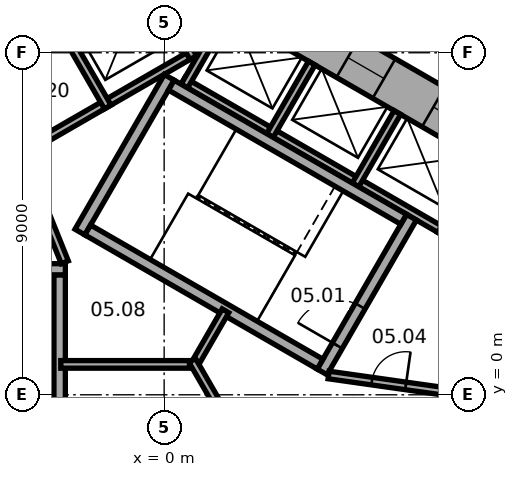
"""IFC4 building model, lengths in metres.
Left out: names, types, materials, properties, quantities, classifications, styles, units other than length and angle.
Written with IfcOpenShell. Run it as: python <this file> out.ifc"""

import sys

from ifc_helpers import new_model, si_unit, direction, frame, frame_2d, origin, place, context, subcontext, project, spatial, rectangle, extrude, element, fill, save


model = new_model("IFC4")
c1 = context("Model", 3, precision=1e-05, world=origin(), true_north=direction((0.0, 1.0)))
c2 = subcontext(c1, "Body", "Model", "MODEL_VIEW")
j1 = project(units=[si_unit("LENGTHUNIT", "METRE"), si_unit("PLANEANGLEUNIT", "RADIAN")], contexts=[c1])
p1 = place(None, origin())
s1 = spatial("IfcSite", under=j1, at=p1, CompositionType="ELEMENT")
p2 = place(p1, origin())
s2 = spatial("IfcBuilding", under=s1, at=p2, CompositionType="ELEMENT")
p3 = place(p2, frame((0.0, 0.0, 34.5)))
s3 = spatial("IfcBuildingStorey", under=s2, at=p3, CompositionType="ELEMENT", Elevation=34.5)
p4 = place(p3, frame((10.4, 5.658, 0.0), z_axis=(0.0, 0.0, 1.0), x_axis=(-0.866021384402, 0.500006961711, 0.0)))
e1 = element("IfcWall", 1, at=p4, inside=s3, PredefinedType="SHEAR", context=c2, shape_type="SweptSolid", body=[
    extrude(rectangle(XDim=12.355, YDim=1.2, at=frame_2d((6.178, 0.0))), origin(), (0.0, 0.0, 1.0), 4.5),
])
p5 = place(p4, frame((2.728, 0.0, 0.0)))
e2 = element("IfcOpeningElement", 2, at=p5, cuts=e1, PredefinedType="OPENING", context=c2, shape_type="SweptSolid", body=[
    extrude(rectangle(XDim=1.1, YDim=2.1, at=frame_2d((0.55, 1.05))), frame((0.0, 0.61, 0.0), z_axis=(0.0, -1.0, 0.0), x_axis=(1.0, 0.0, 0.0)), (0.0, 0.0, 1.0), 1.22),
])
p6 = place(p4, frame((5.328, 0.0, 0.0)))
e3 = element("IfcOpeningElement", 3, at=p6, cuts=e1, PredefinedType="OPENING", context=c2, shape_type="SweptSolid", body=[
    extrude(rectangle(XDim=1.1, YDim=2.1, at=frame_2d((0.55, 1.05))), frame((0.0, 0.61, 0.0), z_axis=(0.0, -1.0, 0.0), x_axis=(1.0, 0.0, 0.0)), (0.0, 0.0, 1.0), 1.22),
])
p7 = place(p4, frame((7.928, 0.0, 0.0)))
e4 = element("IfcOpeningElement", 4, at=p7, cuts=e1, PredefinedType="OPENING", context=c2, shape_type="SweptSolid", body=[
    extrude(rectangle(XDim=1.1, YDim=2.1, at=frame_2d((0.55, 1.05))), frame((0.0, 0.61, 0.0), z_axis=(0.0, -1.0, 0.0), x_axis=(1.0, 0.0, 0.0)), (0.0, 0.0, 1.0), 1.22),
])
p8 = place(p3, frame((0.3, 11.836, 0.0), z_axis=(0.0, 0.0, 1.0), x_axis=(-0.866021384402, -0.500006961711, 0.0)))
e5 = element("IfcWall", 5, at=p8, inside=s3, PredefinedType="SHEAR", context=c2, shape_type="SweptSolid", body=[
    extrude(rectangle(XDim=12.355, YDim=1.2, at=frame_2d((6.178, 0.0))), origin(), (0.0, 0.0, 1.0), 4.5),
])
p9 = place(p8, frame((6.378, 0.0, 0.0)))
e6 = element("IfcOpeningElement", 6, at=p9, cuts=e5, PredefinedType="OPENING", context=c2, shape_type="SweptSolid", body=[
    extrude(rectangle(XDim=1.5, YDim=2.1, at=frame_2d((0.75, 1.05))), frame((0.0, 0.61, 0.0), z_axis=(0.0, -1.0, 0.0), x_axis=(1.0, 0.0, 0.0)), (0.0, 0.0, 1.0), 1.22),
])
p10 = place(p8, frame((1.828, 0.0, 0.0)))
e7 = element("IfcOpeningElement", 7, at=p10, cuts=e5, PredefinedType="OPENING", context=c2, shape_type="SweptSolid", body=[
    extrude(rectangle(XDim=1.1, YDim=2.1, at=frame_2d((0.55, 1.05))), frame((0.0, 0.61, 0.0), z_axis=(0.0, -1.0, 0.0), x_axis=(1.0, 0.0, 0.0)), (0.0, 0.0, 1.0), 1.22),
])
p11 = place(p3, frame((7.424, 4.259, 0.0), z_axis=(0.0, 0.0, 1.0), x_axis=(-0.866026010844, 0.49999894854, 0.0)))
e8 = element("IfcWall", 8, at=p11, inside=s3, PredefinedType="PARTITIONING", context=c2, shape_type="SweptSolid", body=[
    extrude(rectangle(XDim=8.0, YDim=0.2, at=frame_2d((4.0, 0.0))), origin(), (0.0, 0.0, 1.0), 4.2),
])
for number, where, z_axis, x_axis in (
    (9, (7.287, 4.222, 0.0), (0.0, 0.0, 1.0), (0.5, 0.866, 0.0)),
    (10, (5.036, 5.522, 0.0), (0.0, 0.0, 1.0), (0.5, 0.866, 0.0)),
    (11, (2.784, 6.822, 0.0), (0.0, 0.0, 1.0), (0.5, 0.866, 0.0)),
    (12, (0.532, 8.122, 0.0), (0.0, 0.0, 1.0), (0.5, 0.866, 0.0)),
):
    element("IfcWall", number, at=place(p3, frame(where, z_axis=z_axis, x_axis=x_axis)), inside=s3, PredefinedType="PARTITIONING", context=c2, shape_type="SweptSolid", body=[
        extrude(rectangle(XDim=2.2, YDim=0.2, at=frame_2d((1.1, 0.0))), origin(), (0.0, 0.0, 1.0), 4.2),
    ])
p12 = place(p3, frame((0.803, 9.009, 0.0), z_axis=(0.0, 0.0, 1.0), x_axis=(-0.866028230842, -0.499995103361, 0.0)))
e13 = element("IfcWall", 13, at=p12, inside=s3, PredefinedType="PARTITIONING", context=c2, shape_type="SweptSolid", body=[
    extrude(rectangle(XDim=5.4, YDim=0.2, at=frame_2d((2.7, 0.0))), origin(), (0.0, 0.0, 1.0), 4.2),
])
p13 = place(p3, frame((0.767, 8.872, 0.0), z_axis=(0.0, 0.0, 1.0), x_axis=(-0.499994660107, 0.866028486751, 0.0)))
e14 = element("IfcWall", 14, at=p13, inside=s3, PredefinedType="PARTITIONING", context=c2, shape_type="SweptSolid", body=[
    extrude(rectangle(XDim=2.2, YDim=0.2, at=frame_2d((1.1, 0.0))), origin(), (0.0, 0.0, 1.0), 4.2),
])
p14 = place(p3, frame((-1.485, 7.572, 0.0), z_axis=(0.0, 0.0, 1.0), x_axis=(-0.50002983664, 0.866008176907, 0.0)))
e15 = element("IfcWall", 15, at=p14, inside=s3, PredefinedType="PARTITIONING", context=c2, shape_type="SweptSolid", body=[
    extrude(rectangle(XDim=2.2, YDim=0.2, at=frame_2d((1.1, 0.0))), origin(), (0.0, 0.0, 1.0), 4.2),
])
p15 = place(p3, frame((4.158, 0.602, 0.0), z_axis=(0.0, 0.0, 1.0), x_axis=(0.499977259774, 0.866038532462, 0.0)))
e16 = element("IfcWall", 16, at=p15, inside=s3, PredefinedType="SHEAR", context=c2, shape_type="SweptSolid", body=[
    extrude(rectangle(XDim=4.7, YDim=0.3, at=frame_2d((2.35, 0.0))), origin(), (0.0, 0.0, 1.0), 4.2),
])
p16 = place(p15, frame((0.8, 0.0, 0.0)))
e17 = element("IfcOpeningElement", 17, at=p16, cuts=e16, PredefinedType="OPENING", context=c2, shape_type="SweptSolid", body=[
    extrude(rectangle(XDim=1.2, YDim=2.1, at=frame_2d((0.6, 1.05))), frame((0.0, 0.16, 0.0), z_axis=(0.0, -1.0, 0.0), x_axis=(1.0, 0.0, 0.0)), (0.0, 0.0, 1.0), 0.32),
])
p17 = place(p3, frame((-2.216, 4.282, 0.0), z_axis=(0.0, 0.0, 1.0), x_axis=(0.499977259774, 0.866038532462, 0.0)))
e18 = element("IfcWall", 18, at=p17, inside=s3, PredefinedType="SHEAR", context=c2, shape_type="SweptSolid", body=[
    extrude(rectangle(XDim=4.7, YDim=0.3, at=frame_2d((2.35, 0.0))), origin(), (0.0, 0.0, 1.0), 4.2),
])
for number, where, z_axis, x_axis in (
    (19, (4.103, 0.807, 0.0), (0.0, 0.0, 1.0), (-0.866, 0.5, 0.0)),
    (20, (6.303, 4.617, 0.0), (0.0, 0.0, 1.0), (-0.866, 0.5, 0.0)),
):
    element("IfcWall", number, at=place(p3, frame(where, z_axis=z_axis, x_axis=x_axis)), inside=s3, PredefinedType="SHEAR", context=c2, shape_type="SweptSolid", body=[
        extrude(rectangle(XDim=7.06, YDim=0.3, at=frame_2d((3.53, 0.0))), origin(), (0.0, 0.0, 1.0), 4.2),
    ])
p18 = place(p3, frame((-2.6, 3.3, 0.0), z_axis=(0.0, 0.0, 1.0), x_axis=(-1.0, 0.0, 0.0)))
e21 = element("IfcWall", 21, at=p18, inside=s3, PredefinedType="SHEAR", context=c2, shape_type="SweptSolid", body=[
    extrude(rectangle(XDim=4.7, YDim=0.3, at=frame_2d((2.35, 0.0))), origin(), (0.0, 0.0, 1.0), 4.2),
])
p19 = place(p18, frame((0.8, 0.0, 0.0)))
e22 = element("IfcOpeningElement", 22, at=p19, cuts=e21, PredefinedType="OPENING", context=c2, shape_type="SweptSolid", body=[
    extrude(rectangle(XDim=1.2, YDim=2.1, at=frame_2d((0.6, 1.05))), frame((0.0, 0.16, 0.0), z_axis=(0.0, -1.0, 0.0), x_axis=(1.0, 0.0, 0.0)), (0.0, 0.0, 1.0), 0.32),
])
p20 = place(p3, frame((-2.75, 3.15, 0.0), z_axis=(0.0, 0.0, 1.0), x_axis=(0.0, -1.0, 0.0)))
e23 = element("IfcWall", 23, at=p20, inside=s3, PredefinedType="SHEAR", context=c2, shape_type="SweptSolid", body=[
    extrude(rectangle(XDim=7.06, YDim=0.3, at=frame_2d((3.53, 0.0))), origin(), (0.0, 0.0, 1.0), 4.2),
])
p21 = place(p3, frame((4.327, 0.521, 0.0), z_axis=(0.0, 0.0, 1.0), x_axis=(0.990124376366, -0.14019172346, 0.0)))
e24 = element("IfcWall", 24, at=p21, inside=s3, PredefinedType="PARTITIONING", context=c2, shape_type="SweptSolid", body=[
    extrude(rectangle(XDim=3.002, YDim=0.2, at=frame_2d((1.501, 0.0))), origin(), (0.0, 0.0, 1.0), 4.2),
])
p22 = place(p21, frame((1.15, 0.0, 0.0)))
e25 = element("IfcOpeningElement", 25, at=p22, cuts=e24, PredefinedType="OPENING", context=c2, shape_type="SweptSolid", body=[
    extrude(rectangle(XDim=0.9, YDim=2.1, at=frame_2d((0.45, 1.05))), frame((0.0, 0.11, 0.0), z_axis=(0.0, -1.0, 0.0), x_axis=(1.0, 0.0, 0.0)), (0.0, 0.0, 1.0), 0.22),
])
p23 = place(p3, frame((-2.615, 3.487, 0.0), z_axis=(0.0, 0.0, 1.0), x_axis=(-0.373576831041, 0.92759924068, 0.0)))
e26 = element("IfcWall", 26, at=p23, inside=s3, PredefinedType="PARTITIONING", context=c2, shape_type="SweptSolid", body=[
    extrude(rectangle(XDim=3.002, YDim=0.2, at=frame_2d((1.501, 0.0))), origin(), (0.0, 0.0, 1.0), 4.2),
])
p24 = place(p23, frame((1.15, 0.0, 0.0)))
e27 = element("IfcOpeningElement", 27, at=p24, cuts=e26, PredefinedType="OPENING", context=c2, shape_type="SweptSolid", body=[
    extrude(rectangle(XDim=0.9, YDim=2.1, at=frame_2d((0.45, 1.05))), frame((0.0, 0.11, 0.0), z_axis=(0.0, -1.0, 0.0), x_axis=(1.0, 0.0, 0.0)), (0.0, 0.0, 1.0), 0.22),
])
p25 = place(p3, frame((0.92, 0.8, 0.0), z_axis=(0.0, 0.0, 1.0), x_axis=(-1.0, 0.0, 0.0)))
e28 = element("IfcWall", 28, at=p25, inside=s3, PredefinedType="PARTITIONING", context=c2, shape_type="SweptSolid", body=[
    extrude(rectangle(XDim=3.64, YDim=0.2, at=frame_2d((1.82, 0.0))), origin(), (0.0, 0.0, 1.0), 4.2),
])
p26 = place(p3, frame((0.74, 0.696, 0.0), z_axis=(0.0, 0.0, 1.0), x_axis=(0.499956301907, 0.86605063142, 0.0)))
e29 = element("IfcWall", 29, at=p26, inside=s3, PredefinedType="PARTITIONING", context=c2, shape_type="SweptSolid", body=[
    extrude(rectangle(XDim=1.747, YDim=0.2, at=frame_2d((0.874, 0.0))), origin(), (0.0, 0.0, 1.0), 4.2),
])
p27 = place(p3, frame((0.74, 0.904, 0.0), z_axis=(0.0, 0.0, 1.0), x_axis=(0.500028278809, -0.866009076391, 0.0)))
e30 = element("IfcWall", 30, at=p27, inside=s3, PredefinedType="PARTITIONING", context=c2, shape_type="SweptSolid", body=[
    extrude(rectangle(XDim=3.133, YDim=0.2, at=frame_2d((1.566, 0.0))), origin(), (0.0, 0.0, 1.0), 4.2),
])
p28 = place(p16, origin())
e31 = element("IfcDoor", 31, at=p28, inside=s3, OperationType="SINGLE_SWING_RIGHT", PredefinedType="DOOR", context=c2, shape_type="SweptSolid", body=[
    extrude(rectangle(XDim=1.2, YDim=2.1, at=frame_2d((0.6, 1.05))), frame((0.0, 0.025, 0.0), z_axis=(0.0, -1.0, 0.0), x_axis=(1.0, 0.0, 0.0)), (0.0, 0.0, 1.0), 0.05),
])
fill(e17, e31)
p29 = place(p22, origin())
e32 = element("IfcDoor", 32, at=p29, inside=s3, OperationType="SINGLE_SWING_LEFT", PredefinedType="DOOR", context=c2, shape_type="SweptSolid", body=[
    extrude(rectangle(XDim=0.9, YDim=2.1, at=frame_2d((0.45, 1.05))), frame((0.0, 0.025, 0.0), z_axis=(0.0, -1.0, 0.0), x_axis=(1.0, 0.0, 0.0)), (0.0, 0.0, 1.0), 0.05),
])
fill(e25, e32)
p30 = place(p5, origin())
e33 = element("IfcDoor", 33, at=p30, inside=s3, OperationType="DOUBLE_DOOR_SLIDING", PredefinedType="DOOR", context=c2, shape_type="SweptSolid", body=[
    extrude(rectangle(XDim=1.1, YDim=2.1, at=frame_2d((0.55, 1.05))), frame((0.0, 0.025, 0.0), z_axis=(0.0, -1.0, 0.0), x_axis=(1.0, 0.0, 0.0)), (0.0, 0.0, 1.0), 0.05),
])
fill(e2, e33)
p31 = place(p6, origin())
e34 = element("IfcDoor", 34, at=p31, inside=s3, OperationType="DOUBLE_DOOR_SLIDING", PredefinedType="DOOR", context=c2, shape_type="SweptSolid", body=[
    extrude(rectangle(XDim=1.1, YDim=2.1, at=frame_2d((0.55, 1.05))), frame((0.0, 0.025, 0.0), z_axis=(0.0, -1.0, 0.0), x_axis=(1.0, 0.0, 0.0)), (0.0, 0.0, 1.0), 0.05),
])
fill(e3, e34)
save(model, sys.argv[1])
